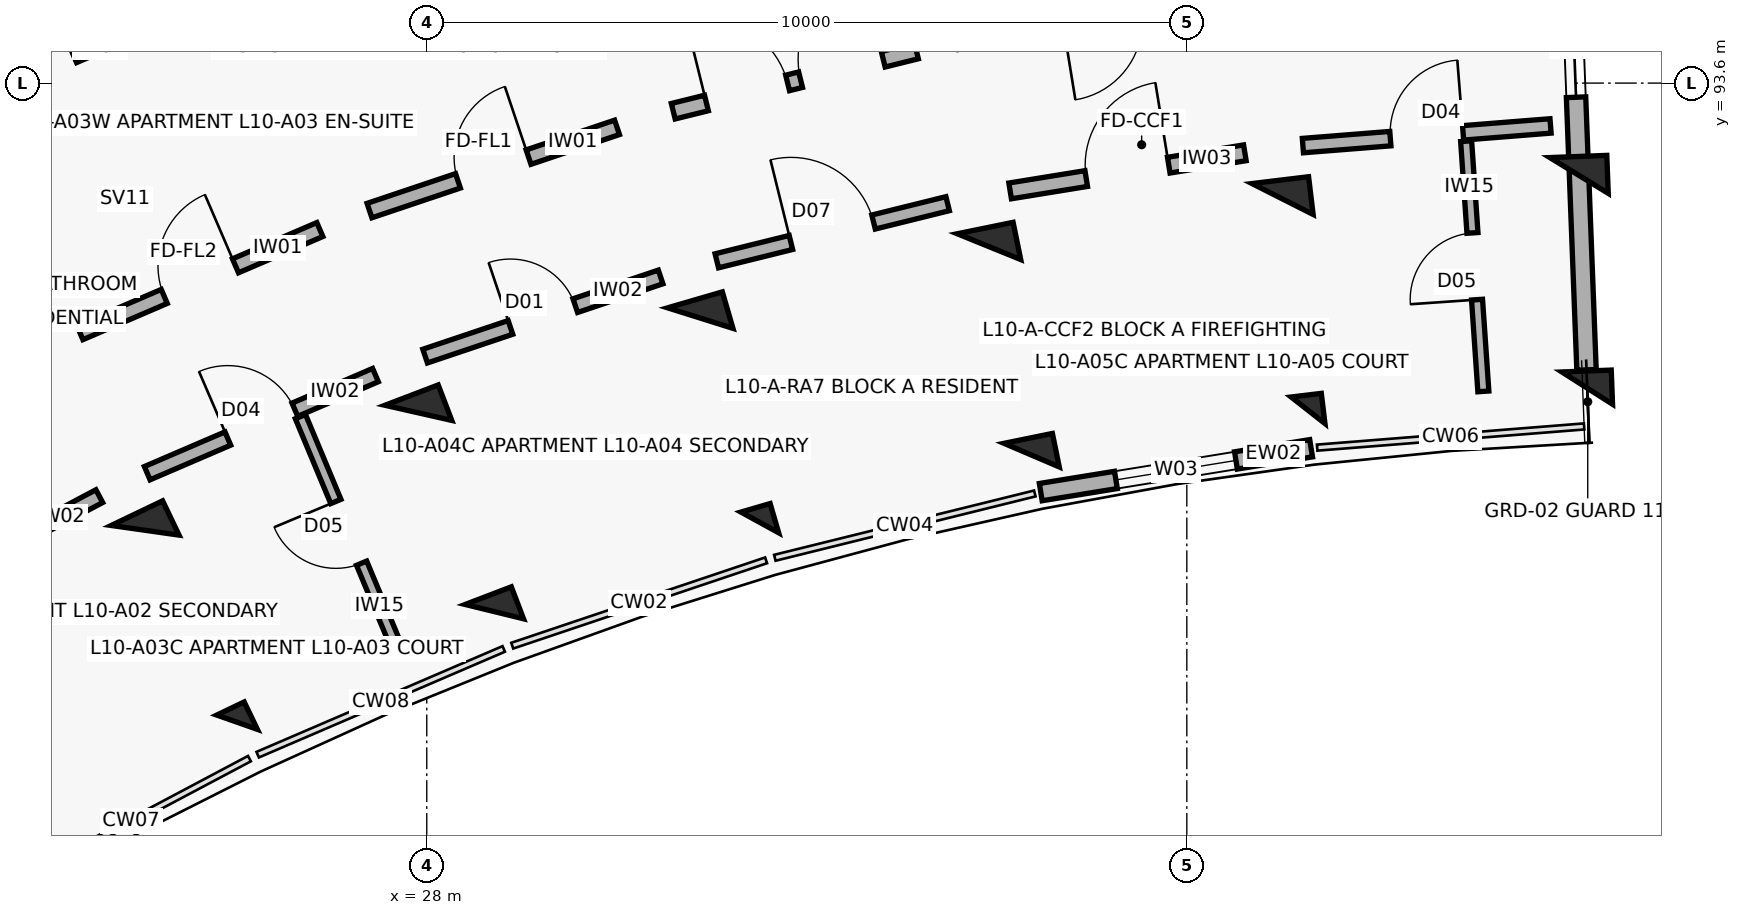
"""IFC4 building model, lengths in metres.
Left out: names, types, materials, properties, quantities, classifications, styles, units other than length and angle.
Written with IfcOpenShell. Run it as: python <this file> out.ifc"""

import sys

from ifc_helpers import new_model, si_unit, direction, frame, frame_2d, origin, origin_2d, place, context, subcontext, project, spatial, rectangle, extrude, element, fill, save


model = new_model("IFC4")
c1 = context("Model", 3, precision=1e-05, world=origin(), true_north=direction((0.0, 1.0)))
c2 = subcontext(c1, "Body", "Model", "MODEL_VIEW")
j1 = project(units=[si_unit("LENGTHUNIT", "METRE"), si_unit("PLANEANGLEUNIT", "RADIAN")], contexts=[c1])
p1 = place(None, origin())
s1 = spatial("IfcSite", under=j1, at=p1, CompositionType="ELEMENT")
p2 = place(p1, origin())
s2 = spatial("IfcBuilding", under=s1, at=p2, CompositionType="ELEMENT")
p3 = place(p2, frame((0.0, 0.0, 32.9)))
s3 = spatial("IfcBuildingStorey", under=s2, at=p3, CompositionType="ELEMENT", Elevation=32.9)
p4 = place(p3, frame((25.504, 85.191, 0.0), z_axis=(0.0, 0.0, 1.0), x_axis=(-0.432085748802, 0.901832526405, 0.0)))
e1 = element("IfcColumn", 1, at=p4, inside=s3, PredefinedType="COLUMN", context=c2, shape_type="SweptSolid", body=[
    extrude(rectangle(XDim=0.4, YDim=0.4, at=origin_2d()), origin(), (0.0, 0.0, 1.0), 3.1),
])
p5 = place(p3, frame((24.294, 87.716, 0.0), z_axis=(0.0, 0.0, 1.0), x_axis=(-0.432085748802, 0.901832526405, 0.0)))
e2 = element("IfcColumn", 2, at=p5, inside=s3, PredefinedType="COLUMN", context=c2, shape_type="SweptSolid", body=[
    extrude(rectangle(XDim=0.5, YDim=0.75, at=origin_2d()), origin(), (0.0, 0.0, 1.0), 3.1),
])
p6 = place(p3, frame((28.889, 86.646, 0.0), z_axis=(0.0, 0.0, 1.0), x_axis=(-0.357064076459, 0.934079892355, 0.0)))
e3 = element("IfcColumn", 3, at=p6, inside=s3, PredefinedType="COLUMN", context=c2, shape_type="SweptSolid", body=[
    extrude(rectangle(XDim=0.45, YDim=0.65, at=origin_2d()), origin(), (0.0, 0.0, 1.0), 3.1),
])
p7 = place(p3, frame((27.889, 89.261, 0.0), z_axis=(0.0, 0.0, 1.0), x_axis=(-0.357064076459, 0.934079892355, 0.0)))
e4 = element("IfcColumn", 4, at=p7, inside=s3, PredefinedType="COLUMN", context=c2, shape_type="SweptSolid", body=[
    extrude(rectangle(XDim=0.5, YDim=0.75, at=origin_2d()), origin(), (0.0, 0.0, 1.0), 3.1),
])
p8 = place(p3, frame((32.382, 87.82, 0.0), z_axis=(0.0, 0.0, 1.0), x_axis=(-0.27966144946, 0.96009867914, 0.0)))
e5 = element("IfcColumn", 5, at=p8, inside=s3, PredefinedType="COLUMN", context=c2, shape_type="SweptSolid", body=[
    extrude(rectangle(XDim=0.4, YDim=0.4, at=origin_2d()), origin(), (0.0, 0.0, 1.0), 3.1),
])
p9 = place(p3, frame((31.599, 90.508, 0.0), z_axis=(0.0, 0.0, 1.0), x_axis=(-0.27966144946, 0.96009867914, 0.0)))
e6 = element("IfcColumn", 6, at=p9, inside=s3, PredefinedType="COLUMN", context=c2, shape_type="SweptSolid", body=[
    extrude(rectangle(XDim=0.5, YDim=0.75, at=origin_2d()), origin(), (0.0, 0.0, 1.0), 3.1),
])
p10 = place(p3, frame((35.958, 88.705, 0.0), z_axis=(0.0, 0.0, 1.0), x_axis=(-0.200393999665, 0.979715389742, 0.0)))
e7 = element("IfcColumn", 7, at=p10, inside=s3, PredefinedType="COLUMN", context=c2, shape_type="SweptSolid", body=[
    extrude(rectangle(XDim=0.45, YDim=0.65, at=origin_2d()), origin(), (0.0, 0.0, 1.0), 3.1),
])
p11 = place(p3, frame((35.397, 91.448, 0.0), z_axis=(0.0, 0.0, 1.0), x_axis=(-0.200393999665, 0.979715389742, 0.0)))
e8 = element("IfcColumn", 8, at=p11, inside=s3, PredefinedType="COLUMN", context=c2, shape_type="SweptSolid", body=[
    extrude(rectangle(XDim=0.5, YDim=0.75, at=origin_2d()), origin(), (0.0, 0.0, 1.0), 3.1),
])
p12 = place(p3, frame((39.595, 89.295, 0.0), z_axis=(0.0, 0.0, 1.0), x_axis=(-0.119790293837, 0.992799217114, 0.0)))
e9 = element("IfcColumn", 9, at=p12, inside=s3, PredefinedType="COLUMN", context=c2, shape_type="SweptSolid", body=[
    extrude(rectangle(XDim=0.4, YDim=0.4, at=origin_2d()), origin(), (0.0, 0.0, 1.0), 3.1),
])
p13 = place(p3, frame((39.26, 92.075, 0.0), z_axis=(0.0, 0.0, 1.0), x_axis=(-0.119790293837, 0.992799217114, 0.0)))
e10 = element("IfcColumn", 10, at=p13, inside=s3, PredefinedType="COLUMN", context=c2, shape_type="SweptSolid", body=[
    extrude(rectangle(XDim=0.5, YDim=0.75, at=origin_2d()), origin(), (0.0, 0.0, 1.0), 3.1),
])
p14 = place(p3, frame((43.268, 89.587, 0.0), z_axis=(0.0, 0.0, 1.0), x_axis=(-0.038387809088, 0.999262916411, 0.0)))
e11 = element("IfcColumn", 11, at=p14, inside=s3, PredefinedType="COLUMN", context=c2, shape_type="SweptSolid", body=[
    extrude(rectangle(XDim=0.45, YDim=0.65, at=origin_2d()), origin(), (0.0, 0.0, 1.0), 3.1),
])
p15 = place(p3, frame((43.16, 92.385, 0.0), z_axis=(0.0, 0.0, 1.0), x_axis=(-0.038387809088, 0.999262916411, 0.0)))
e12 = element("IfcColumn", 12, at=p15, inside=s3, PredefinedType="COLUMN", context=c2, shape_type="SweptSolid", body=[
    extrude(rectangle(XDim=0.5, YDim=0.75, at=origin_2d()), origin(), (0.0, 0.0, 1.0), 3.1),
])
p16 = place(p3, frame((36.078, 88.218, 0.0), z_axis=(0.0, 0.0, 1.0), x_axis=(0.987080874485, 0.160222804952, 0.0)))
e13 = element("IfcWall", 13, at=p16, inside=s3, PredefinedType="SOLIDWALL", context=c2, shape_type="SweptSolid", body=[
    extrude(rectangle(XDim=3.604, YDim=0.23, at=frame_2d((1.802, 0.0))), origin(), (0.0, 0.0, 1.0), 2.25),
])
p17 = place(p16, frame((1.002, 0.0, 0.32)))
e14 = element("IfcOpeningElement", 14, at=p17, cuts=e13, PredefinedType="OPENING", context=c2, shape_type="SweptSolid", body=[
    extrude(rectangle(XDim=1.6, YDim=1.5, at=frame_2d((0.8, 0.75))), frame((0.0, 0.125, 0.0), z_axis=(0.0, -1.0, 0.0), x_axis=(1.0, 0.0, 0.0)), (0.0, 0.0, 1.0), 0.25),
])
p18 = place(p3, frame((43.259, 89.827, 0.0), z_axis=(0.0, 0.0, 1.0), x_axis=(-0.038407966241, 0.999262141847, 0.0)))
e15 = element("IfcWall", 15, at=p18, inside=s3, PredefinedType="SOLIDWALL", context=c2, shape_type="SweptSolid", body=[
    extrude(rectangle(XDim=8.2, YDim=0.255, at=frame_2d((4.1, 0.0))), origin(), (0.0, 0.0, 1.0), 2.18),
])
p19 = place(p18, frame((3.59, 0.0, 0.75)))
e16 = element("IfcOpeningElement", 16, at=p19, cuts=e15, PredefinedType="OPENING", context=c2, shape_type="SweptSolid", body=[
    extrude(rectangle(XDim=1.35, YDim=1.35, at=frame_2d((0.675, 0.675))), frame((0.0, 0.137, 0.0), z_axis=(0.0, -1.0, 0.0), x_axis=(1.0, 0.0, 0.0)), (0.0, 0.0, 1.0), 0.275),
])
p20 = place(p3, frame((20.804, 86.634, 0.0), z_axis=(0.0, 0.0, 1.0), x_axis=(0.883444301944, 0.468536194293, 0.0)))
e17 = element("IfcWall", 17, at=p20, inside=s3, PredefinedType="SOLIDWALL", context=c2, shape_type="SweptSolid", body=[
    extrude(rectangle(XDim=3.269, YDim=0.19, at=frame_2d((1.634, 0.0))), origin(), (0.0, 0.0, 1.0), 2.08),
])
p21 = place(p20, frame((1.164, 0.0, 0.0)))
e18 = element("IfcOpeningElement", 18, at=p21, cuts=e17, PredefinedType="OPENING", context=c2, shape_type="SweptSolid", body=[
    extrude(rectangle(XDim=0.94, YDim=2.1, at=frame_2d((0.47, 1.05))), frame((0.0, 0.105, 0.0), z_axis=(0.0, -1.0, 0.0), x_axis=(1.0, 0.0, 0.0)), (0.0, 0.0, 1.0), 0.21),
])
p22 = place(p3, frame((23.437, 90.316, 0.0), z_axis=(0.0, 0.0, 1.0), x_axis=(0.918718172399, 0.394913813008, 0.0)))
e19 = element("IfcWall", 19, at=p22, inside=s3, PredefinedType="SOLIDWALL", context=c2, shape_type="SweptSolid", body=[
    extrude(rectangle(XDim=3.436, YDim=0.2, at=frame_2d((1.718, 0.0))), origin(), (0.0, 0.0, 1.0), 2.08),
])
p23 = place(p22, frame((1.208, 0.0, 0.0)))
e20 = element("IfcOpeningElement", 20, at=p23, cuts=e19, PredefinedType="OPENING", context=c2, shape_type="SweptSolid", body=[
    extrude(rectangle(XDim=1.02, YDim=2.15, at=frame_2d((0.51, 1.075))), frame((0.0, 0.11, 0.0), z_axis=(0.0, -1.0, 0.0), x_axis=(1.0, 0.0, 0.0)), (0.0, 0.0, 1.0), 0.22),
])
p24 = place(p3, frame((24.322, 88.467, 0.0), z_axis=(0.0, 0.0, 1.0), x_axis=(0.918723391052, 0.394901672235, 0.0)))
e21 = element("IfcWall", 21, at=p24, inside=s3, PredefinedType="SOLIDWALL", context=c2, shape_type="SweptSolid", body=[
    extrude(rectangle(XDim=3.269, YDim=0.19, at=frame_2d((1.634, 0.0))), origin(), (0.0, 0.0, 1.0), 2.08),
])
p25 = place(p24, frame((1.154, 0.0, 0.0)))
e22 = element("IfcOpeningElement", 22, at=p25, cuts=e21, PredefinedType="OPENING", context=c2, shape_type="SweptSolid", body=[
    extrude(rectangle(XDim=0.96, YDim=2.1, at=frame_2d((0.48, 1.05))), frame((0.0, 0.105, 0.0), z_axis=(0.0, -1.0, 0.0), x_axis=(1.0, 0.0, 0.0)), (0.0, 0.0, 1.0), 0.21),
])
p26 = place(p3, frame((27.609, 86.166, 0.0), z_axis=(0.0, 0.0, 1.0), x_axis=(-0.385151143297, 0.922853507777, 0.0)))
e23 = element("IfcWall", 23, at=p26, inside=s3, PredefinedType="PARTITIONING", context=c2, shape_type="SweptSolid", body=[
    extrude(rectangle(XDim=3.3, YDim=0.145, at=frame_2d((1.65, 0.0))), origin(), (0.0, 0.0, 1.0), 2.08),
])
p27 = place(p26, frame((1.21, 0.0, 0.0)))
e24 = element("IfcOpeningElement", 24, at=p27, cuts=e23, PredefinedType="OPENING", context=c2, shape_type="SweptSolid", body=[
    extrude(rectangle(XDim=0.88, YDim=2.1, at=frame_2d((0.44, 1.05))), frame((0.0, 0.083, 0.0), z_axis=(0.0, -1.0, 0.0), x_axis=(1.0, 0.0, 0.0)), (0.0, 0.0, 1.0), 0.165),
])
p28 = place(p3, frame((21.943, 93.317, 0.0), z_axis=(0.0, 0.0, 1.0), x_axis=(0.918726854017, 0.394893615684, 0.0)))
e25 = element("IfcWall", 25, at=p28, inside=s3, PredefinedType="PARTITIONING", context=c2, shape_type="SweptSolid", body=[
    extrude(rectangle(XDim=3.81, YDim=0.13, at=frame_2d((1.905, 0.0))), origin(), (0.0, 0.0, 1.0), 2.08),
])
p29 = place(p28, frame((0.65, 0.0, 0.0)))
e26 = element("IfcOpeningElement", 26, at=p29, cuts=e25, PredefinedType="OPENING", context=c2, shape_type="SweptSolid", body=[
    extrude(rectangle(XDim=0.9, YDim=2.1, at=frame_2d((0.45, 1.05))), frame((0.0, 0.075, 0.0), z_axis=(0.0, -1.0, 0.0), x_axis=(1.0, 0.0, 0.0)), (0.0, 0.0, 1.0), 0.15),
])
p30 = place(p28, frame((2.28, 0.0, 0.0)))
e27 = element("IfcOpeningElement", 27, at=p30, cuts=e25, PredefinedType="OPENING", context=c2, shape_type="SweptSolid", body=[
    extrude(rectangle(XDim=0.88, YDim=2.1, at=frame_2d((0.44, 1.05))), frame((0.0, 0.075, 0.0), z_axis=(0.0, -1.0, 0.0), x_axis=(1.0, 0.0, 0.0)), (0.0, 0.0, 1.0), 0.15),
])
p31 = place(p3, frame((27.247, 91.923, 0.0), z_axis=(0.0, 0.0, 1.0), x_axis=(0.947863007629, 0.318678080151, 0.0)))
e28 = element("IfcWall", 28, at=p31, inside=s3, PredefinedType="SOLIDWALL", context=c2, shape_type="SweptSolid", body=[
    extrude(rectangle(XDim=3.436, YDim=0.2, at=frame_2d((1.718, 0.0))), origin(), (0.0, 0.0, 1.0), 2.08),
])
p32 = place(p31, frame((1.228, 0.0, 0.0)))
e29 = element("IfcOpeningElement", 29, at=p32, cuts=e28, PredefinedType="OPENING", context=c2, shape_type="SweptSolid", body=[
    extrude(rectangle(XDim=0.98, YDim=2.15, at=frame_2d((0.49, 1.075))), frame((0.0, 0.11, 0.0), z_axis=(0.0, -1.0, 0.0), x_axis=(1.0, 0.0, 0.0)), (0.0, 0.0, 1.0), 0.22),
])
p33 = place(p3, frame((27.979, 90.008, 0.0), z_axis=(0.0, 0.0, 1.0), x_axis=(0.94787351033, 0.318646839643, 0.0)))
e30 = element("IfcWall", 30, at=p33, inside=s3, PredefinedType="SOLIDWALL", context=c2, shape_type="SweptSolid", body=[
    extrude(rectangle(XDim=3.269, YDim=0.19, at=frame_2d((1.634, 0.0))), origin(), (0.0, 0.0, 1.0), 2.08),
])
p34 = place(p33, frame((1.184, 0.0, 0.0)))
e31 = element("IfcOpeningElement", 31, at=p34, cuts=e30, PredefinedType="OPENING", context=c2, shape_type="SweptSolid", body=[
    extrude(rectangle(XDim=0.9, YDim=2.1, at=frame_2d((0.45, 1.05))), frame((0.0, 0.105, 0.0), z_axis=(0.0, -1.0, 0.0), x_axis=(1.0, 0.0, 0.0)), (0.0, 0.0, 1.0), 0.21),
])
p35 = place(p3, frame((31.243, 93.23, 0.0), z_axis=(0.0, 0.0, 1.0), x_axis=(0.970719238682, 0.240216901263, 0.0)))
e32 = element("IfcWall", 32, at=p35, inside=s3, PredefinedType="SOLIDWALL", context=c2, shape_type="SweptSolid", body=[
    extrude(rectangle(XDim=3.296, YDim=0.21, at=frame_2d((1.648, 0.0))), origin(), (0.0, 0.0, 1.0), 2.08),
])
p36 = place(p35, frame((0.45, 0.0, 0.0)))
e33 = element("IfcOpeningElement", 33, at=p36, cuts=e32, PredefinedType="OPENING", context=c2, shape_type="SweptSolid", body=[
    extrude(rectangle(XDim=1.1, YDim=2.15, at=frame_2d((0.55, 1.075))), frame((0.0, 0.115, 0.0), z_axis=(0.0, -1.0, 0.0), x_axis=(1.0, 0.0, 0.0)), (0.0, 0.0, 1.0), 0.23),
])
p37 = place(p35, frame((1.726, 0.0, 0.0)))
e34 = element("IfcOpeningElement", 34, at=p37, cuts=e32, PredefinedType="OPENING", context=c2, shape_type="SweptSolid", body=[
    extrude(rectangle(XDim=1.12, YDim=2.15, at=frame_2d((0.56, 1.075))), frame((0.0, 0.115, 0.0), z_axis=(0.0, -1.0, 0.0), x_axis=(1.0, 0.0, 0.0)), (0.0, 0.0, 1.0), 0.23),
])
p38 = place(p3, frame((31.816, 91.262, 0.0), z_axis=(0.0, 0.0, 1.0), x_axis=(0.970727194092, 0.240184751078, 0.0)))
e35 = element("IfcWall", 35, at=p38, inside=s3, PredefinedType="SOLIDWALL", context=c2, shape_type="SweptSolid", body=[
    extrude(rectangle(XDim=3.129, YDim=0.19, at=frame_2d((1.564, 0.0))), origin(), (0.0, 0.0, 1.0), 2.08),
])
p39 = place(p38, frame((1.004, 0.0, 0.0)))
e36 = element("IfcOpeningElement", 36, at=p39, cuts=e35, PredefinedType="OPENING", context=c2, shape_type="SweptSolid", body=[
    extrude(rectangle(XDim=1.12, YDim=2.15, at=frame_2d((0.56, 1.075))), frame((0.0, 0.105, 0.0), z_axis=(0.0, -1.0, 0.0), x_axis=(1.0, 0.0, 0.0)), (0.0, 0.0, 1.0), 0.21),
])
p40 = place(p3, frame((35.676, 92.181, 0.0), z_axis=(0.0, 0.0, 1.0), x_axis=(0.98707079686, 0.160284877599, 0.0)))
e37 = element("IfcWall", 37, at=p40, inside=s3, PredefinedType="SOLIDWALL", context=c2, shape_type="SweptSolid", body=[
    extrude(rectangle(XDim=3.129, YDim=0.21, at=frame_2d((1.564, 0.0))), origin(), (0.0, 0.0, 1.0), 2.08),
])
p41 = place(p40, frame((1.014, 0.0, 0.0)))
e38 = element("IfcOpeningElement", 38, at=p41, cuts=e37, PredefinedType="OPENING", context=c2, shape_type="SweptSolid", body=[
    extrude(rectangle(XDim=1.1, YDim=2.15, at=frame_2d((0.55, 1.075))), frame((0.0, 0.115, 0.0), z_axis=(0.0, -1.0, 0.0), x_axis=(1.0, 0.0, 0.0)), (0.0, 0.0, 1.0), 0.23),
])
p42 = place(p3, frame((39.527, 92.778, 0.0), z_axis=(0.0, 0.0, 1.0), x_axis=(0.99686660806, 0.07910098441, 0.0)))
e39 = element("IfcWall", 39, at=p42, inside=s3, PredefinedType="SOLIDWALL", context=c2, shape_type="SweptSolid", body=[
    extrude(rectangle(XDim=3.269, YDim=0.19, at=frame_2d((1.634, 0.0))), origin(), (0.0, 0.0, 1.0), 2.08),
])
p43 = place(p42, frame((1.154, 0.0, 0.0)))
e40 = element("IfcOpeningElement", 40, at=p43, cuts=e39, PredefinedType="OPENING", context=c2, shape_type="SweptSolid", body=[
    extrude(rectangle(XDim=0.96, YDim=2.1, at=frame_2d((0.48, 1.05))), frame((0.0, 0.105, 0.0), z_axis=(0.0, -1.0, 0.0), x_axis=(1.0, 0.0, 0.0)), (0.0, 0.0, 1.0), 0.21),
])
p44 = place(p3, frame((41.901, 89.543, 0.0), z_axis=(0.0, 0.0, 1.0), x_axis=(-0.068581194944, 0.997645538105, 0.0)))
e41 = element("IfcWall", 41, at=p44, inside=s3, PredefinedType="PARTITIONING", context=c2, shape_type="SweptSolid", body=[
    extrude(rectangle(XDim=3.3, YDim=0.145, at=frame_2d((1.65, 0.0))), origin(), (0.0, 0.0, 1.0), 2.08),
])
p45 = place(p44, frame((1.21, 0.0, 0.0)))
e42 = element("IfcOpeningElement", 42, at=p45, cuts=e41, PredefinedType="OPENING", context=c2, shape_type="SweptSolid", body=[
    extrude(rectangle(XDim=0.88, YDim=2.1, at=frame_2d((0.44, 1.05))), frame((0.0, 0.083, 0.0), z_axis=(0.0, -1.0, 0.0), x_axis=(1.0, 0.0, 0.0)), (0.0, 0.0, 1.0), 0.165),
])
p46 = place(p17, origin())
e43 = element("IfcWindow", 43, at=p46, inside=s3, PartitioningType="DOUBLE_PANEL_VERTICAL", PredefinedType="WINDOW", context=c2, shape_type="SweptSolid", body=[
    extrude(rectangle(XDim=1.6, YDim=1.5, at=frame_2d((0.8, 0.75))), frame((0.0, 0.03, 0.0), z_axis=(0.0, -1.0, 0.0), x_axis=(1.0, 0.0, 0.0)), (0.0, 0.0, 1.0), 0.06),
])
fill(e14, e43)
p47 = place(p19, origin())
e44 = element("IfcWindow", 44, at=p47, inside=s3, PartitioningType="DOUBLE_PANEL_VERTICAL", PredefinedType="WINDOW", context=c2, shape_type="SweptSolid", body=[
    extrude(rectangle(XDim=1.35, YDim=1.35, at=frame_2d((0.675, 0.675))), frame((0.0, 0.03, 0.0), z_axis=(0.0, -1.0, 0.0), x_axis=(1.0, 0.0, 0.0)), (0.0, 0.0, 1.0), 0.06),
])
fill(e16, e44)
p48 = place(p23, origin())
e45 = element("IfcDoor", 45, at=p48, inside=s3, OperationType="SINGLE_SWING_RIGHT", PredefinedType="DOOR", context=c2, shape_type="SweptSolid", body=[
    extrude(rectangle(XDim=1.02, YDim=2.15, at=frame_2d((0.51, 1.075))), frame((0.0, 0.025, 0.0), z_axis=(0.0, -1.0, 0.0), x_axis=(1.0, 0.0, 0.0)), (0.0, 0.0, 1.0), 0.05),
])
fill(e20, e45)
p49 = place(p25, origin())
e46 = element("IfcDoor", 46, at=p49, inside=s3, OperationType="SINGLE_SWING_LEFT", PredefinedType="DOOR", context=c2, shape_type="SweptSolid", body=[
    extrude(rectangle(XDim=0.96, YDim=2.1, at=frame_2d((0.48, 1.05))), frame((0.0, 0.025, 0.0), z_axis=(0.0, -1.0, 0.0), x_axis=(1.0, 0.0, 0.0)), (0.0, 0.0, 1.0), 0.05),
])
fill(e22, e46)
p50 = place(p27, origin())
e47 = element("IfcDoor", 47, at=p50, inside=s3, OperationType="SINGLE_SWING_RIGHT", PredefinedType="DOOR", context=c2, shape_type="SweptSolid", body=[
    extrude(rectangle(XDim=0.88, YDim=2.1, at=frame_2d((0.44, 1.05))), frame((0.0, 0.025, 0.0), z_axis=(0.0, -1.0, 0.0), x_axis=(1.0, 0.0, 0.0)), (0.0, 0.0, 1.0), 0.05),
])
fill(e24, e47)
p51 = place(p29, origin())
e48 = element("IfcDoor", 48, at=p51, inside=s3, OperationType="SINGLE_SWING_LEFT", PredefinedType="DOOR", context=c2, shape_type="SweptSolid", body=[
    extrude(rectangle(XDim=0.9, YDim=2.1, at=frame_2d((0.45, 1.05))), frame((0.0, 0.025, 0.0), z_axis=(0.0, -1.0, 0.0), x_axis=(1.0, 0.0, 0.0)), (0.0, 0.0, 1.0), 0.05),
])
fill(e26, e48)
p52 = place(p32, origin())
e49 = element("IfcDoor", 49, at=p52, inside=s3, OperationType="SINGLE_SWING_RIGHT", PredefinedType="DOOR", context=c2, shape_type="SweptSolid", body=[
    extrude(rectangle(XDim=0.98, YDim=2.15, at=frame_2d((0.49, 1.075))), frame((0.0, 0.025, 0.0), z_axis=(0.0, -1.0, 0.0), x_axis=(1.0, 0.0, 0.0)), (0.0, 0.0, 1.0), 0.05),
])
fill(e29, e49)
p53 = place(p34, origin())
e50 = element("IfcDoor", 50, at=p53, inside=s3, OperationType="SINGLE_SWING_LEFT", PredefinedType="DOOR", context=c2, shape_type="SweptSolid", body=[
    extrude(rectangle(XDim=0.9, YDim=2.1, at=frame_2d((0.45, 1.05))), frame((0.0, 0.025, 0.0), z_axis=(0.0, -1.0, 0.0), x_axis=(1.0, 0.0, 0.0)), (0.0, 0.0, 1.0), 0.05),
])
fill(e31, e50)
p54 = place(p36, origin())
e51 = element("IfcDoor", 51, at=p54, inside=s3, OperationType="SINGLE_SWING_LEFT", PredefinedType="DOOR", context=c2, shape_type="SweptSolid", body=[
    extrude(rectangle(XDim=1.1, YDim=2.15, at=frame_2d((0.55, 1.075))), frame((0.0, 0.025, 0.0), z_axis=(0.0, -1.0, 0.0), x_axis=(1.0, 0.0, 0.0)), (0.0, 0.0, 1.0), 0.05),
])
fill(e33, e51)
p55 = place(p37, origin())
e52 = element("IfcDoor", 52, at=p55, inside=s3, OperationType="SINGLE_SWING_RIGHT", PredefinedType="DOOR", context=c2, shape_type="SweptSolid", body=[
    extrude(rectangle(XDim=1.12, YDim=2.15, at=frame_2d((0.56, 1.075))), frame((0.0, 0.025, 0.0), z_axis=(0.0, -1.0, 0.0), x_axis=(1.0, 0.0, 0.0)), (0.0, 0.0, 1.0), 0.05),
])
fill(e34, e52)
p56 = place(p39, origin())
e53 = element("IfcDoor", 53, at=p56, inside=s3, OperationType="SINGLE_SWING_LEFT", PredefinedType="DOOR", context=c2, shape_type="SweptSolid", body=[
    extrude(rectangle(XDim=1.12, YDim=2.15, at=frame_2d((0.56, 1.075))), frame((0.0, 0.025, 0.0), z_axis=(0.0, -1.0, 0.0), x_axis=(1.0, 0.0, 0.0)), (0.0, 0.0, 1.0), 0.05),
])
fill(e36, e53)
p57 = place(p41, origin())
e54 = element("IfcDoor", 54, at=p57, inside=s3, OperationType="SINGLE_SWING_RIGHT", PredefinedType="DOOR", context=c2, shape_type="SweptSolid", body=[
    extrude(rectangle(XDim=1.1, YDim=2.15, at=frame_2d((0.55, 1.075))), frame((0.0, 0.025, 0.0), z_axis=(0.0, -1.0, 0.0), x_axis=(1.0, 0.0, 0.0)), (0.0, 0.0, 1.0), 0.05),
])
fill(e38, e54)
p58 = place(p43, origin())
e55 = element("IfcDoor", 55, at=p58, inside=s3, OperationType="SINGLE_SWING_RIGHT", PredefinedType="DOOR", context=c2, shape_type="SweptSolid", body=[
    extrude(rectangle(XDim=0.96, YDim=2.1, at=frame_2d((0.48, 1.05))), frame((0.0, 0.025, 0.0), z_axis=(0.0, -1.0, 0.0), x_axis=(1.0, 0.0, 0.0)), (0.0, 0.0, 1.0), 0.05),
])
fill(e40, e55)
p59 = place(p45, origin())
e56 = element("IfcDoor", 56, at=p59, inside=s3, OperationType="SINGLE_SWING_LEFT", PredefinedType="DOOR", context=c2, shape_type="SweptSolid", body=[
    extrude(rectangle(XDim=0.88, YDim=2.1, at=frame_2d((0.44, 1.05))), frame((0.0, 0.025, 0.0), z_axis=(0.0, -1.0, 0.0), x_axis=(1.0, 0.0, 0.0)), (0.0, 0.0, 1.0), 0.05),
])
fill(e42, e56)
save(model, sys.argv[1])
